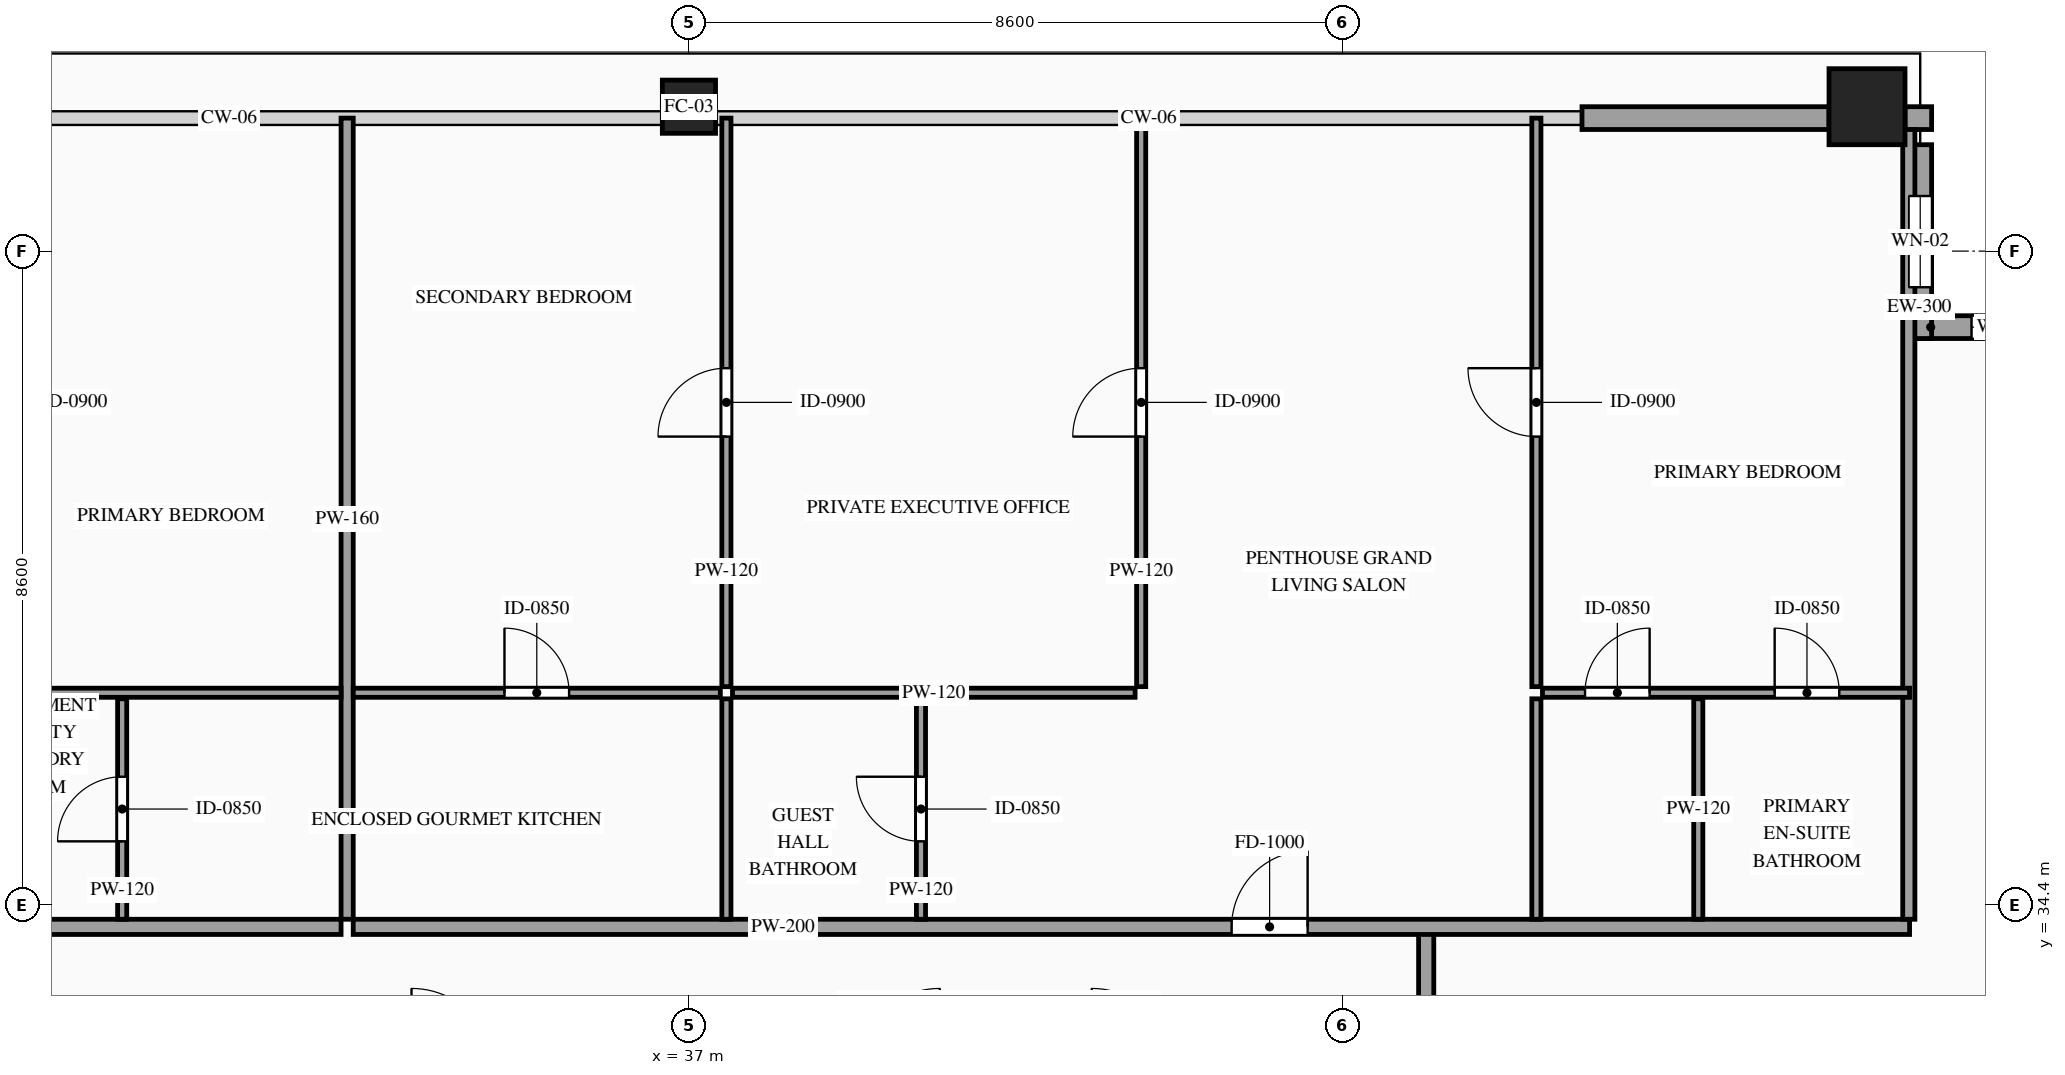
"""IFC4 building model, lengths in metres.
Left out: names, types, materials, properties, quantities, classifications, styles, units other than length and angle.
Written with IfcOpenShell. Run it as: python <this file> out.ifc"""

import sys

from ifc_helpers import new_model, si_unit, direction, frame, frame_2d, origin, origin_2d, place, context, subcontext, project, spatial, rectangle, hollow_rectangle, extrude, source, transform, mapped, element, fill, save


model = new_model("IFC4")
c1 = context("Model", 3, precision=1e-05, world=origin(), true_north=direction((0.0, 1.0)))
c2 = subcontext(c1, "Body", "Model", "MODEL_VIEW")
j1 = project(units=[si_unit("LENGTHUNIT", "METRE"), si_unit("PLANEANGLEUNIT", "RADIAN")], contexts=[c1])
p1 = place(None, origin())
s1 = spatial("IfcSite", under=j1, at=p1, CompositionType="ELEMENT")
p2 = place(p1, origin())
s2 = spatial("IfcBuilding", under=s1, at=p2, CompositionType="ELEMENT")
p3 = place(p2, frame((0.0, 0.0, 343.2)))
s3 = spatial("IfcBuildingStorey", under=s2, at=p3, CompositionType="ELEMENT", Elevation=343.2)
m1 = source(origin(), c2, "Body", "SweptSolid", [
    extrude(hollow_rectangle(XDim=0.7, YDim=0.7, WallThickness=0.032, at=origin_2d()), origin(), (0.0, 0.0, 1.0), 4.0),
])
p4 = place(p3, frame((37.0, 44.9, 0.0), z_axis=(0.0, 0.0, 1.0), x_axis=(1.0, 0.0, 0.0)))
e1 = element("IfcColumn", 1, at=p4, inside=s3, PredefinedType="COLUMN", context=c2, shape_type="MappedRepresentation", body=[
    mapped(m1, transform((0.0, 0.0, 0.0), scale=1.0)),
])
m2 = source(origin(), c2, "Body", "SweptSolid", [
    extrude(hollow_rectangle(XDim=1.0, YDim=1.0, WallThickness=0.048, at=origin_2d()), origin(), (0.0, 0.0, 1.0), 4.0),
])
p5 = place(p3, frame((52.5, 44.9, 0.0), z_axis=(0.0, 0.0, 1.0), x_axis=(1.0, 0.0, 0.0)))
e2 = element("IfcColumn", 2, at=p5, inside=s3, PredefinedType="COLUMN", context=c2, shape_type="MappedRepresentation", body=[
    mapped(m2, transform((0.0, 0.0, 0.0), scale=1.0)),
])
p6 = place(p3, frame((55.6, 42.0, 0.0), z_axis=(0.0, 0.0, 1.0), x_axis=(-1.0, 0.0, 0.0)))
e3 = element("IfcWall", 3, at=p6, inside=s3, PredefinedType="SOLIDWALL", context=c2, shape_type="SweptSolid", body=[
    extrude(rectangle(XDim=2.55, YDim=0.3, at=frame_2d((1.275, 0.0))), origin(), (0.0, 0.0, 1.0), 3.76),
])
p7 = place(p6, frame((0.825, 0.0, 0.85)))
e4 = element("IfcOpeningElement", 4, at=p7, cuts=e3, PredefinedType="OPENING", context=c2, shape_type="SweptSolid", body=[
    extrude(rectangle(XDim=0.9, YDim=1.5, at=frame_2d((0.45, 0.75))), frame((0.0, 0.165, 0.0), z_axis=(0.0, -1.0, 0.0), x_axis=(1.0, 0.0, 0.0)), (0.0, 0.0, 1.0), 0.33),
])
p8 = place(p3, frame((53.2, 41.85, 0.0), z_axis=(0.0, 0.0, 1.0), x_axis=(0.0, 1.0, 0.0)))
e5 = element("IfcWall", 5, at=p8, inside=s3, PredefinedType="SOLIDWALL", context=c2, shape_type="SweptSolid", body=[
    extrude(rectangle(XDim=2.55, YDim=0.3, at=frame_2d((1.275, 0.0))), origin(), (0.0, 0.0, 1.0), 3.76),
])
p9 = place(p8, frame((0.675, 0.0, 0.85)))
e6 = element("IfcOpeningElement", 6, at=p9, cuts=e5, PredefinedType="OPENING", context=c2, shape_type="SweptSolid", body=[
    extrude(rectangle(XDim=1.2, YDim=2.1, at=frame_2d((0.6, 1.05))), frame((0.0, 0.165, 0.0), z_axis=(0.0, -1.0, 0.0), x_axis=(1.0, 0.0, 0.0)), (0.0, 0.0, 1.0), 0.33),
])
m3 = source(origin(), c2, "Body", "SweptSolid", [
    extrude(rectangle(XDim=0.35, YDim=0.3, at=frame_2d((0.175, 0.0))), origin(), (0.0, 0.0, 1.0), 3.76),
])
p10 = place(p3, frame((53.0, 44.75, 0.0), z_axis=(0.0, 0.0, 1.0), x_axis=(1.0, 0.0, 0.0)))
e7 = element("IfcWall", 7, at=p10, inside=s3, PredefinedType="SOLIDWALL", context=c2, shape_type="MappedRepresentation", body=[
    mapped(m3, transform((0.0, 0.0, 0.0), scale=1.0)),
])
m4 = source(origin(), c2, "Body", "SweptSolid", [
    extrude(rectangle(XDim=3.25, YDim=0.3, at=frame_2d((1.625, 0.0))), origin(), (0.0, 0.0, 1.0), 3.365),
])
p11 = place(p3, frame((48.75, 44.75, 0.0), z_axis=(0.0, 0.0, 1.0), x_axis=(1.0, 0.0, 0.0)))
e8 = element("IfcWall", 8, at=p11, inside=s3, PredefinedType="SOLIDWALL", context=c2, shape_type="MappedRepresentation", body=[
    mapped(m4, transform((0.0, 0.0, 0.0), scale=1.0)),
])
m5 = source(origin(), c2, "Body", "SweptSolid", [
    extrude(rectangle(XDim=1.7, YDim=0.2, at=frame_2d((0.85, 0.0))), origin(), (0.0, 0.0, 1.0), 3.76),
])
p12 = place(p3, frame((46.7, 32.35, 0.0), z_axis=(0.0, 0.0, 1.0), x_axis=(0.0, 1.0, 0.0)))
e9 = element("IfcWall", 9, at=p12, inside=s3, PredefinedType="PARTITIONING", context=c2, shape_type="MappedRepresentation", body=[
    mapped(m5, transform((0.0, 0.0, 0.0), scale=1.0)),
])
p13 = place(p3, frame((20.94, 34.11, 0.0), z_axis=(0.0, 0.0, 1.0), x_axis=(1.0, 0.0, 0.0)))
e10 = element("IfcWall", 10, at=p13, inside=s3, PredefinedType="PARTITIONING", context=c2, shape_type="SweptSolid", body=[
    extrude(rectangle(XDim=11.483, YDim=0.2, at=frame_2d((5.742, 0.0))), origin(), (0.0, 0.0, 1.0), 3.76),
])
p14 = place(p13, frame((4.552, 0.0, 0.0)))
e11 = element("IfcOpeningElement", 11, at=p14, cuts=e10, PredefinedType="OPENING", context=c2, shape_type="SweptSolid", body=[
    extrude(rectangle(XDim=1.0, YDim=2.2, at=frame_2d((0.5, 1.1))), frame((0.0, 0.115, 0.0), z_axis=(0.0, -1.0, 0.0), x_axis=(1.0, 0.0, 0.0)), (0.0, 0.0, 1.0), 0.23),
])
m6 = source(origin(), c2, "Body", "SweptSolid", [
    extrude(rectangle(XDim=10.54, YDim=0.16, at=frame_2d((5.27, 0.0))), origin(), (0.0, 0.0, 1.0), 3.76),
])
p15 = place(p3, frame((32.503, 34.21, 0.0), z_axis=(0.0, 0.0, 1.0), x_axis=(0.0, 1.0, 0.0)))
e12 = element("IfcWall", 12, at=p15, inside=s3, PredefinedType="PARTITIONING", context=c2, shape_type="MappedRepresentation", body=[
    mapped(m6, transform((0.0, 0.0, 0.0), scale=1.0)),
])
p16 = place(p3, frame((29.543, 34.21, 0.0), z_axis=(0.0, 0.0, 1.0), x_axis=(0.0, 1.0, 0.0)))
e13 = element("IfcWall", 13, at=p16, inside=s3, PredefinedType="PARTITIONING", context=c2, shape_type="SweptSolid", body=[
    extrude(rectangle(XDim=2.9, YDim=0.12, at=frame_2d((1.45, 0.0))), origin(), (0.0, 0.0, 1.0), 3.76),
])
p17 = place(p16, frame((1.025, 0.0, 0.0)))
e14 = element("IfcOpeningElement", 14, at=p17, cuts=e13, PredefinedType="OPENING", context=c2, shape_type="SweptSolid", body=[
    extrude(rectangle(XDim=0.85, YDim=2.1, at=frame_2d((0.425, 1.05))), frame((0.0, 0.075, 0.0), z_axis=(0.0, -1.0, 0.0), x_axis=(1.0, 0.0, 0.0)), (0.0, 0.0, 1.0), 0.15),
])
m7 = source(origin(), c2, "Body", "SweptSolid", [
    extrude(rectangle(XDim=4.823, YDim=0.12, at=frame_2d((2.412, 0.0))), origin(), (0.0, 0.0, 1.0), 3.76),
])
p18 = place(p3, frame((27.6, 37.19, 0.0), z_axis=(0.0, 0.0, 1.0), x_axis=(1.0, 0.0, 0.0)))
e15 = element("IfcWall", 15, at=p18, inside=s3, PredefinedType="PARTITIONING", context=c2, shape_type="MappedRepresentation", body=[
    mapped(m7, transform((0.0, 0.0, 0.0), scale=1.0)),
])
p19 = place(p3, frame((32.583, 34.11, 0.0), z_axis=(0.0, 0.0, 1.0), x_axis=(1.0, 0.0, 0.0)))
e16 = element("IfcWall", 16, at=p19, inside=s3, PredefinedType="PARTITIONING", context=c2, shape_type="SweptSolid", body=[
    extrude(rectangle(XDim=20.477, YDim=0.2, at=frame_2d((10.239, 0.0))), origin(), (0.0, 0.0, 1.0), 3.76),
])
p20 = place(p19, frame((11.557, 0.0, 0.0)))
e17 = element("IfcOpeningElement", 17, at=p20, cuts=e16, PredefinedType="OPENING", context=c2, shape_type="SweptSolid", body=[
    extrude(rectangle(XDim=1.0, YDim=2.2, at=frame_2d((0.5, 1.1))), frame((0.0, 0.115, 0.0), z_axis=(0.0, -1.0, 0.0), x_axis=(1.0, 0.0, 0.0)), (0.0, 0.0, 1.0), 0.23),
])
m8 = source(origin(), c2, "Body", "SweptSolid", [
    extrude(rectangle(XDim=10.39, YDim=0.16, at=frame_2d((5.195, 0.0))), origin(), (0.0, 0.0, 1.0), 3.76),
])
p21 = place(p3, frame((53.05, 34.21, 0.0), z_axis=(0.0, 0.0, 1.0), x_axis=(0.0, 1.0, 0.0)))
e18 = element("IfcWall", 18, at=p21, inside=s3, PredefinedType="PARTITIONING", context=c2, shape_type="MappedRepresentation", body=[
    mapped(m8, transform((0.0, 0.0, 0.0), scale=1.0)),
])
p22 = place(p3, frame((32.583, 37.19, 0.0), z_axis=(0.0, 0.0, 1.0), x_axis=(1.0, 0.0, 0.0)))
e19 = element("IfcWall", 19, at=p22, inside=s3, PredefinedType="PARTITIONING", context=c2, shape_type="SweptSolid", body=[
    extrude(rectangle(XDim=4.83, YDim=0.12, at=frame_2d((2.415, 0.0))), origin(), (0.0, 0.0, 1.0), 3.76),
])
p23 = place(p22, frame((1.99, 0.0, 0.0)))
e20 = element("IfcOpeningElement", 20, at=p23, cuts=e19, PredefinedType="OPENING", context=c2, shape_type="SweptSolid", body=[
    extrude(rectangle(XDim=0.85, YDim=2.1, at=frame_2d((0.425, 1.05))), frame((0.0, 0.075, 0.0), z_axis=(0.0, -1.0, 0.0), x_axis=(1.0, 0.0, 0.0)), (0.0, 0.0, 1.0), 0.15),
])
m9 = source(origin(), c2, "Body", "SweptSolid", [
    extrude(rectangle(XDim=2.9, YDim=0.12, at=frame_2d((1.45, 0.0))), origin(), (0.0, 0.0, 1.0), 3.76),
])
p24 = place(p3, frame((37.493, 34.21, 0.0), z_axis=(0.0, 0.0, 1.0), x_axis=(0.0, 1.0, 0.0)))
e21 = element("IfcWall", 21, at=p24, inside=s3, PredefinedType="PARTITIONING", context=c2, shape_type="MappedRepresentation", body=[
    mapped(m9, transform((0.0, 0.0, 0.0), scale=1.0)),
])
p25 = place(p3, frame((40.053, 34.21, 0.0), z_axis=(0.0, 0.0, 1.0), x_axis=(0.0, 1.0, 0.0)))
e22 = element("IfcWall", 22, at=p25, inside=s3, PredefinedType="PARTITIONING", context=c2, shape_type="SweptSolid", body=[
    extrude(rectangle(XDim=2.9, YDim=0.12, at=frame_2d((1.45, 0.0))), origin(), (0.0, 0.0, 1.0), 3.76),
])
p26 = place(p25, frame((1.025, 0.0, 0.0)))
e23 = element("IfcOpeningElement", 23, at=p26, cuts=e22, PredefinedType="OPENING", context=c2, shape_type="SweptSolid", body=[
    extrude(rectangle(XDim=0.85, YDim=2.1, at=frame_2d((0.425, 1.05))), frame((0.0, 0.075, 0.0), z_axis=(0.0, -1.0, 0.0), x_axis=(1.0, 0.0, 0.0)), (0.0, 0.0, 1.0), 0.15),
])
m10 = source(origin(), c2, "Body", "SweptSolid", [
    extrude(rectangle(XDim=2.9, YDim=0.12, at=frame_2d((1.45, 0.0))), origin(), (0.0, 0.0, 1.0), 3.305),
])
p27 = place(p3, frame((50.28, 34.21, 0.0), z_axis=(0.0, 0.0, 1.0), x_axis=(0.0, 1.0, 0.0)))
e24 = element("IfcWall", 24, at=p27, inside=s3, PredefinedType="PARTITIONING", context=c2, shape_type="MappedRepresentation", body=[
    mapped(m10, transform((0.0, 0.0, 0.0), scale=1.0)),
])
p28 = place(p3, frame((48.15, 34.21, 0.0), z_axis=(0.0, 0.0, 1.0), x_axis=(0.0, 1.0, 0.0)))
e25 = element("IfcWall", 25, at=p28, inside=s3, PredefinedType="PARTITIONING", context=c2, shape_type="MappedRepresentation", body=[
    mapped(m9, transform((0.0, 0.0, 0.0), scale=1.0)),
])
p29 = place(p3, frame((37.493, 37.27, 0.0), z_axis=(0.0, 0.0, 1.0), x_axis=(0.0, 1.0, 0.0)))
e26 = element("IfcWall", 26, at=p29, inside=s3, PredefinedType="PARTITIONING", context=c2, shape_type="SweptSolid", body=[
    extrude(rectangle(XDim=7.48, YDim=0.12, at=frame_2d((3.74, 0.0))), origin(), (0.0, 0.0, 1.0), 3.76),
])
p30 = place(p29, frame((3.29, 0.0, 0.0)))
e27 = element("IfcOpeningElement", 27, at=p30, cuts=e26, PredefinedType="OPENING", context=c2, shape_type="SweptSolid", body=[
    extrude(rectangle(XDim=0.9, YDim=2.15, at=frame_2d((0.45, 1.075))), frame((0.0, 0.075, 0.0), z_axis=(0.0, -1.0, 0.0), x_axis=(1.0, 0.0, 0.0)), (0.0, 0.0, 1.0), 0.15),
])
p31 = place(p3, frame((48.23, 37.19, 0.0), z_axis=(0.0, 0.0, 1.0), x_axis=(1.0, 0.0, 0.0)))
e28 = element("IfcWall", 28, at=p31, inside=s3, PredefinedType="PARTITIONING", context=c2, shape_type="SweptSolid", body=[
    extrude(rectangle(XDim=4.83, YDim=0.12, at=frame_2d((2.415, 0.0))), origin(), (0.0, 0.0, 1.0), 3.76),
])
p32 = place(p31, frame((3.055, 0.0, 0.0)))
e29 = element("IfcOpeningElement", 29, at=p32, cuts=e28, PredefinedType="OPENING", context=c2, shape_type="SweptSolid", body=[
    extrude(rectangle(XDim=0.85, YDim=2.1, at=frame_2d((0.425, 1.05))), frame((0.0, 0.075, 0.0), z_axis=(0.0, -1.0, 0.0), x_axis=(1.0, 0.0, 0.0)), (0.0, 0.0, 1.0), 0.15),
])
p33 = place(p31, frame((0.56, 0.0, 0.0)))
e30 = element("IfcOpeningElement", 30, at=p33, cuts=e28, PredefinedType="OPENING", context=c2, shape_type="SweptSolid", body=[
    extrude(rectangle(XDim=0.85, YDim=2.1, at=frame_2d((0.425, 1.05))), frame((0.0, 0.075, 0.0), z_axis=(0.0, -1.0, 0.0), x_axis=(1.0, 0.0, 0.0)), (0.0, 0.0, 1.0), 0.15),
])
p34 = place(p3, frame((48.15, 37.27, 0.0), z_axis=(0.0, 0.0, 1.0), x_axis=(0.0, 1.0, 0.0)))
e31 = element("IfcWall", 31, at=p34, inside=s3, PredefinedType="PARTITIONING", context=c2, shape_type="SweptSolid", body=[
    extrude(rectangle(XDim=7.48, YDim=0.12, at=frame_2d((3.74, 0.0))), origin(), (0.0, 0.0, 1.0), 3.76),
])
p35 = place(p34, frame((3.29, 0.0, 0.0)))
e32 = element("IfcOpeningElement", 32, at=p35, cuts=e31, PredefinedType="OPENING", context=c2, shape_type="SweptSolid", body=[
    extrude(rectangle(XDim=0.9, YDim=2.15, at=frame_2d((0.45, 1.075))), frame((0.0, 0.075, 0.0), z_axis=(0.0, -1.0, 0.0), x_axis=(1.0, 0.0, 0.0)), (0.0, 0.0, 1.0), 0.15),
])
m11 = source(origin(), c2, "Body", "SweptSolid", [
    extrude(rectangle(XDim=5.297, YDim=0.12, at=frame_2d((2.648, 0.0))), origin(), (0.0, 0.0, 1.0), 3.76),
])
p36 = place(p3, frame((37.573, 37.19, 0.0), z_axis=(0.0, 0.0, 1.0), x_axis=(1.0, 0.0, 0.0)))
e33 = element("IfcWall", 33, at=p36, inside=s3, PredefinedType="PARTITIONING", context=c2, shape_type="MappedRepresentation", body=[
    mapped(m11, transform((0.0, 0.0, 0.0), scale=1.0)),
])
p37 = place(p3, frame((42.95, 37.27, 0.0), z_axis=(0.0, 0.0, 1.0), x_axis=(0.0, 1.0, 0.0)))
e34 = element("IfcWall", 34, at=p37, inside=s3, PredefinedType="PARTITIONING", context=c2, shape_type="SweptSolid", body=[
    extrude(rectangle(XDim=7.48, YDim=0.12, at=frame_2d((3.74, 0.0))), origin(), (0.0, 0.0, 1.0), 3.76),
])
p38 = place(p37, frame((3.29, 0.0, 0.0)))
e35 = element("IfcOpeningElement", 35, at=p38, cuts=e34, PredefinedType="OPENING", context=c2, shape_type="SweptSolid", body=[
    extrude(rectangle(XDim=0.9, YDim=2.15, at=frame_2d((0.45, 1.075))), frame((0.0, 0.075, 0.0), z_axis=(0.0, -1.0, 0.0), x_axis=(1.0, 0.0, 0.0)), (0.0, 0.0, 1.0), 0.15),
])
m12 = source(origin(), c2, "Body", "SweptSolid", [
    extrude(rectangle(XDim=0.9, YDim=1.5, at=frame_2d((0.45, 0.75))), frame((0.0, 0.03, 0.0), z_axis=(0.0, -1.0, 0.0), x_axis=(1.0, 0.0, 0.0)), (0.0, 0.0, 1.0), 0.06),
])
p39 = place(p7, origin())
e36 = element("IfcWindow", 36, at=p39, inside=s3, PartitioningType="SINGLE_PANEL", PredefinedType="WINDOW", context=c2, shape_type="MappedRepresentation", body=[
    mapped(m12, transform((0.0, 0.0, 0.0), scale=1.0)),
])
fill(e4, e36)
m13 = source(origin(), c2, "Body", "SweptSolid", [
    extrude(rectangle(XDim=1.2, YDim=2.1, at=frame_2d((0.6, 1.05))), frame((0.0, 0.03, 0.0), z_axis=(0.0, -1.0, 0.0), x_axis=(1.0, 0.0, 0.0)), (0.0, 0.0, 1.0), 0.06),
])
p40 = place(p9, origin())
e37 = element("IfcWindow", 37, at=p40, inside=s3, PartitioningType="SINGLE_PANEL", PredefinedType="WINDOW", context=c2, shape_type="MappedRepresentation", body=[
    mapped(m13, transform((0.0, 0.0, 0.0), scale=1.0)),
])
fill(e6, e37)
m14 = source(origin(), c2, "Body", "SweptSolid", [
    extrude(rectangle(XDim=0.85, YDim=2.1, at=frame_2d((0.425, 1.05))), frame((0.0, 0.025, 0.0), z_axis=(0.0, -1.0, 0.0), x_axis=(1.0, 0.0, 0.0)), (0.0, 0.0, 1.0), 0.05),
])
p41 = place(p17, origin())
e38 = element("IfcDoor", 38, at=p41, inside=s3, OperationType="SINGLE_SWING_LEFT", PredefinedType="DOOR", context=c2, shape_type="MappedRepresentation", body=[
    mapped(m14, transform((0.0, 0.0, 0.0), scale=1.0)),
])
fill(e14, e38)
m15 = source(origin(), c2, "Body", "SweptSolid", [
    extrude(rectangle(XDim=1.0, YDim=2.2, at=frame_2d((0.5, 1.1))), frame((0.0, 0.025, 0.0), z_axis=(0.0, -1.0, 0.0), x_axis=(1.0, 0.0, 0.0)), (0.0, 0.0, 1.0), 0.05),
])
p42 = place(p20, origin())
e39 = element("IfcDoor", 39, at=p42, inside=s3, OperationType="SINGLE_SWING_RIGHT", PredefinedType="DOOR", context=c2, shape_type="MappedRepresentation", body=[
    mapped(m15, transform((0.0, 0.0, 0.0), scale=1.0)),
])
fill(e17, e39)
p43 = place(p23, origin())
e40 = element("IfcDoor", 40, at=p43, inside=s3, OperationType="SINGLE_SWING_LEFT", PredefinedType="DOOR", context=c2, shape_type="MappedRepresentation", body=[
    mapped(m14, transform((0.0, 0.0, 0.0), scale=1.0)),
])
fill(e20, e40)
p44 = place(p26, origin())
e41 = element("IfcDoor", 41, at=p44, inside=s3, OperationType="SINGLE_SWING_RIGHT", PredefinedType="DOOR", context=c2, shape_type="MappedRepresentation", body=[
    mapped(m14, transform((0.0, 0.0, 0.0), scale=1.0)),
])
fill(e23, e41)
p45 = place(p32, origin())
e42 = element("IfcDoor", 42, at=p45, inside=s3, OperationType="SINGLE_SWING_LEFT", PredefinedType="DOOR", context=c2, shape_type="MappedRepresentation", body=[
    mapped(m14, transform((0.0, 0.0, 0.0), scale=1.0)),
])
fill(e29, e42)
p46 = place(p33, origin())
e43 = element("IfcDoor", 43, at=p46, inside=s3, OperationType="SINGLE_SWING_RIGHT", PredefinedType="DOOR", context=c2, shape_type="MappedRepresentation", body=[
    mapped(m14, transform((0.0, 0.0, 0.0), scale=1.0)),
])
fill(e30, e43)
m16 = source(origin(), c2, "Body", "SweptSolid", [
    extrude(rectangle(XDim=0.9, YDim=2.15, at=frame_2d((0.45, 1.075))), frame((0.0, 0.025, 0.0), z_axis=(0.0, -1.0, 0.0), x_axis=(1.0, 0.0, 0.0)), (0.0, 0.0, 1.0), 0.05),
])
p47 = place(p30, origin())
e44 = element("IfcDoor", 44, at=p47, inside=s3, OperationType="SINGLE_SWING_LEFT", PredefinedType="DOOR", context=c2, shape_type="MappedRepresentation", body=[
    mapped(m16, transform((0.0, 0.0, 0.0), scale=1.0)),
])
fill(e27, e44)
p48 = place(p35, origin())
e45 = element("IfcDoor", 45, at=p48, inside=s3, OperationType="SINGLE_SWING_RIGHT", PredefinedType="DOOR", context=c2, shape_type="MappedRepresentation", body=[
    mapped(m16, transform((0.0, 0.0, 0.0), scale=1.0)),
])
fill(e32, e45)
p49 = place(p38, origin())
e46 = element("IfcDoor", 46, at=p49, inside=s3, OperationType="SINGLE_SWING_LEFT", PredefinedType="DOOR", context=c2, shape_type="MappedRepresentation", body=[
    mapped(m16, transform((0.0, 0.0, 0.0), scale=1.0)),
])
fill(e35, e46)
save(model, sys.argv[1])
